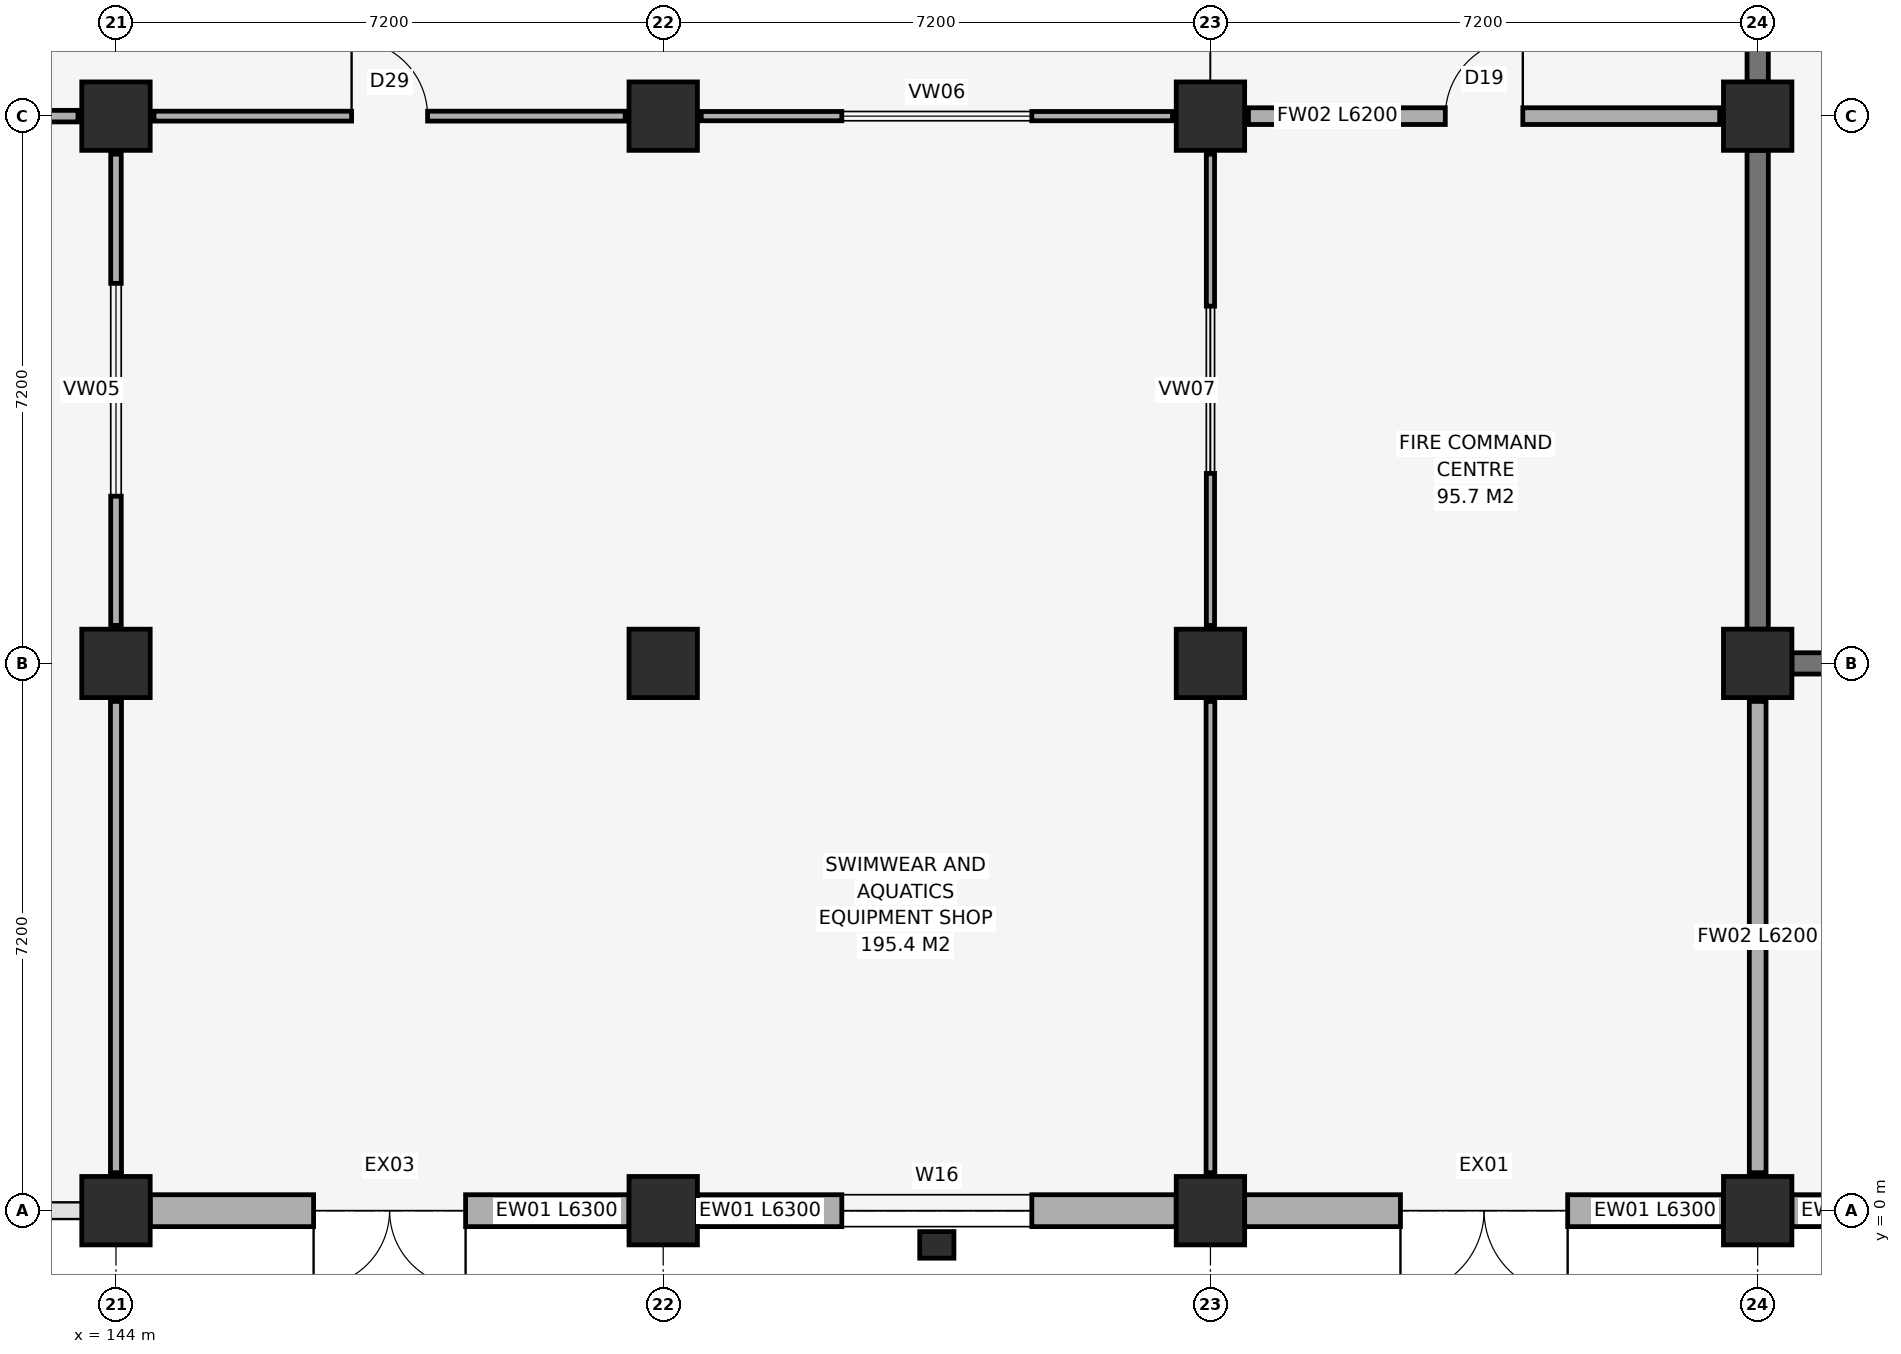
"""IFC4 building model, lengths in metres.
Left out: names, types, materials, properties, quantities, classifications, styles, units other than length and angle.
Written with IfcOpenShell. Run it as: python <this file> out.ifc"""

import sys

from ifc_helpers import new_model, si_unit, direction, frame, frame_2d, origin, origin_2d, place, context, subcontext, project, spatial, rectangle, extrude, element, fill, save


model = new_model("IFC4")
c1 = context("Model", 3, precision=1e-05, world=origin(), true_north=direction((0.0, 1.0)))
c2 = subcontext(c1, "Body", "Model", "MODEL_VIEW")
j1 = project(units=[si_unit("LENGTHUNIT", "METRE"), si_unit("PLANEANGLEUNIT", "RADIAN")], contexts=[c1])
p1 = place(None, origin())
s1 = spatial("IfcSite", under=j1, at=p1, CompositionType="ELEMENT")
p2 = place(p1, origin())
s2 = spatial("IfcBuilding", under=s1, at=p2, CompositionType="ELEMENT")
p3 = place(p2, origin())
s3 = spatial("IfcBuildingStorey", under=s2, at=p3, CompositionType="ELEMENT", Elevation=0.0)
for number, where, z_axis, x_axis in (
    (1, (144.0, 0.0, 0.0), (0.0, 0.0, 1.0), (1.0, 0.0, 0.0)),
    (2, (144.0, 7.2, 0.0), (0.0, 0.0, 1.0), (1.0, 0.0, 0.0)),
    (3, (144.0, 14.4, 0.0), (0.0, 0.0, 1.0), (1.0, 0.0, 0.0)),
    (4, (151.2, 0.0, 0.0), (0.0, 0.0, 1.0), (1.0, 0.0, 0.0)),
    (5, (151.2, 7.2, 0.0), (0.0, 0.0, 1.0), (1.0, 0.0, 0.0)),
    (6, (151.2, 14.4, 0.0), (0.0, 0.0, 1.0), (1.0, 0.0, 0.0)),
    (7, (158.4, 0.0, 0.0), (0.0, 0.0, 1.0), (1.0, 0.0, 0.0)),
    (8, (158.4, 7.2, 0.0), (0.0, 0.0, 1.0), (1.0, 0.0, 0.0)),
    (9, (158.4, 14.4, 0.0), (0.0, 0.0, 1.0), (1.0, 0.0, 0.0)),
    (10, (165.6, 0.0, 0.0), (0.0, 0.0, 1.0), (1.0, 0.0, 0.0)),
    (11, (165.6, 7.2, 0.0), (0.0, 0.0, 1.0), (1.0, 0.0, 0.0)),
    (12, (165.6, 14.4, 0.0), (0.0, 0.0, 1.0), (1.0, 0.0, 0.0)),
):
    element("IfcColumn", number, at=place(p3, frame(where, z_axis=z_axis, x_axis=x_axis)), inside=s3, PredefinedType="COLUMN", context=c2, shape_type="SweptSolid", body=[
        extrude(rectangle(XDim=0.9, YDim=0.9, at=origin_2d()), origin(), (0.0, 0.0, 1.0), 5.4),
    ])
p4 = place(p3, frame((144.45, 0.0, 0.0), z_axis=(0.0, 0.0, 1.0), x_axis=(1.0, 0.0, 0.0)))
e13 = element("IfcWall", 13, at=p4, inside=s3, PredefinedType="SOLIDWALL", context=c2, shape_type="SweptSolid", body=[
    extrude(rectangle(XDim=6.3, YDim=0.42, at=frame_2d((3.15, 0.0))), origin(), (0.0, 0.0, 1.0), 4.64),
])
p5 = place(p4, frame((2.15, 0.0, 0.0)))
e14 = element("IfcOpeningElement", 14, at=p5, cuts=e13, PredefinedType="OPENING", context=c2, shape_type="SweptSolid", body=[
    extrude(rectangle(XDim=2.0, YDim=2.3, at=frame_2d((1.0, 1.15))), frame((0.0, 0.225, 0.0), z_axis=(0.0, -1.0, 0.0), x_axis=(1.0, 0.0, 0.0)), (0.0, 0.0, 1.0), 0.45),
])
p6 = place(p3, frame((151.65, 0.0, 0.0), z_axis=(0.0, 0.0, 1.0), x_axis=(1.0, 0.0, 0.0)))
e15 = element("IfcWall", 15, at=p6, inside=s3, PredefinedType="SOLIDWALL", context=c2, shape_type="SweptSolid", body=[
    extrude(rectangle(XDim=6.3, YDim=0.42, at=frame_2d((3.15, 0.0))), origin(), (0.0, 0.0, 1.0), 4.64),
])
p7 = place(p6, frame((1.9, 0.0, 0.95)))
e16 = element("IfcOpeningElement", 16, at=p7, cuts=e15, PredefinedType="OPENING", context=c2, shape_type="SweptSolid", body=[
    extrude(rectangle(XDim=2.5, YDim=1.35, at=frame_2d((1.25, 0.675))), frame((0.0, 0.225, 0.0), z_axis=(0.0, -1.0, 0.0), x_axis=(1.0, 0.0, 0.0)), (0.0, 0.0, 1.0), 0.45),
])
p8 = place(p3, frame((158.85, 0.0, 0.0), z_axis=(0.0, 0.0, 1.0), x_axis=(1.0, 0.0, 0.0)))
e17 = element("IfcWall", 17, at=p8, inside=s3, PredefinedType="SOLIDWALL", context=c2, shape_type="SweptSolid", body=[
    extrude(rectangle(XDim=6.3, YDim=0.42, at=frame_2d((3.15, 0.0))), origin(), (0.0, 0.0, 1.0), 4.64),
])
p9 = place(p8, frame((2.05, 0.0, 0.0)))
e18 = element("IfcOpeningElement", 18, at=p9, cuts=e17, PredefinedType="OPENING", context=c2, shape_type="SweptSolid", body=[
    extrude(rectangle(XDim=2.2, YDim=2.4, at=frame_2d((1.1, 1.2))), frame((0.0, 0.225, 0.0), z_axis=(0.0, -1.0, 0.0), x_axis=(1.0, 0.0, 0.0)), (0.0, 0.0, 1.0), 0.45),
])
p10 = place(p3, frame((166.05, 0.0, 0.0), z_axis=(0.0, 0.0, 1.0), x_axis=(1.0, 0.0, 0.0)))
e19 = element("IfcWall", 19, at=p10, inside=s3, PredefinedType="SOLIDWALL", context=c2, shape_type="SweptSolid", body=[
    extrude(rectangle(XDim=6.3, YDim=0.42, at=frame_2d((3.15, 0.0))), origin(), (0.0, 0.0, 1.0), 4.64),
])
p11 = place(p10, frame((2.1, 0.0, 0.95)))
e20 = element("IfcOpeningElement", 20, at=p11, cuts=e19, PredefinedType="OPENING", context=c2, shape_type="SweptSolid", body=[
    extrude(rectangle(XDim=2.1, YDim=2.0, at=frame_2d((1.05, 1.0))), frame((0.0, 0.225, 0.0), z_axis=(0.0, -1.0, 0.0), x_axis=(1.0, 0.0, 0.0)), (0.0, 0.0, 1.0), 0.45),
])
for number, where, z_axis, x_axis in (
    (21, (166.05, 7.2, 0.0), (0.0, 0.0, 1.0), (1.0, 0.0, 0.0)),
    (22, (165.6, 7.65, 0.0), (0.0, 0.0, 1.0), (0.0, 1.0, 0.0)),
):
    element("IfcWall", number, at=place(p3, frame(where, z_axis=z_axis, x_axis=x_axis)), inside=s3, PredefinedType="SHEAR", context=c2, shape_type="SweptSolid", body=[
        extrude(rectangle(XDim=6.3, YDim=0.28, at=frame_2d((3.15, 0.0))), origin(), (0.0, 0.0, 1.0), 5.14),
    ])
p12 = place(p3, frame((165.6, 14.85, 0.0), z_axis=(0.0, 0.0, 1.0), x_axis=(0.0, 1.0, 0.0)))
e23 = element("IfcWall", 23, at=p12, inside=s3, PredefinedType="SHEAR", context=c2, shape_type="SweptSolid", body=[
    extrude(rectangle(XDim=6.3, YDim=0.28, at=frame_2d((3.15, 0.0))), origin(), (0.0, 0.0, 1.0), 5.14),
])
p13 = place(p12, frame((2.35, 0.0, 0.0)))
e24 = element("IfcOpeningElement", 24, at=p13, cuts=e23, PredefinedType="OPENING", context=c2, shape_type="SweptSolid", body=[
    extrude(rectangle(XDim=1.6, YDim=2.2, at=frame_2d((0.8, 1.1))), frame((0.0, 0.155, 0.0), z_axis=(0.0, -1.0, 0.0), x_axis=(1.0, 0.0, 0.0)), (0.0, 0.0, 1.0), 0.31),
])
p14 = place(p3, frame((137.3, 14.4, 0.0), z_axis=(0.0, 0.0, 1.0), x_axis=(1.0, 0.0, 0.0)))
e25 = element("IfcWall", 25, at=p14, inside=s3, PredefinedType="PARTITIONING", context=c2, shape_type="SweptSolid", body=[
    extrude(rectangle(XDim=6.2, YDim=0.152, at=frame_2d((3.1, 0.0))), origin(), (0.0, 0.0, 1.0), 4.29),
])
p15 = place(p14, frame((2.15, 0.0, 0.95)))
e26 = element("IfcOpeningElement", 26, at=p15, cuts=e25, PredefinedType="OPENING", context=c2, shape_type="SweptSolid", body=[
    extrude(rectangle(XDim=1.9, YDim=1.5, at=frame_2d((0.95, 0.75))), frame((0.0, 0.091, 0.0), z_axis=(0.0, -1.0, 0.0), x_axis=(1.0, 0.0, 0.0)), (0.0, 0.0, 1.0), 0.182),
])
p16 = place(p3, frame((144.0, 0.5, 0.0), z_axis=(0.0, 0.0, 1.0), x_axis=(0.0, 1.0, 0.0)))
e27 = element("IfcWall", 27, at=p16, inside=s3, PredefinedType="PARTITIONING", context=c2, shape_type="SweptSolid", body=[
    extrude(rectangle(XDim=6.2, YDim=0.145, at=frame_2d((3.1, 0.0))), origin(), (0.0, 0.0, 1.0), 4.34),
])
p17 = place(p3, frame((144.0, 7.7, 0.0), z_axis=(0.0, 0.0, 1.0), x_axis=(0.0, 1.0, 0.0)))
e28 = element("IfcWall", 28, at=p17, inside=s3, PredefinedType="PARTITIONING", context=c2, shape_type="SweptSolid", body=[
    extrude(rectangle(XDim=6.2, YDim=0.138, at=frame_2d((3.1, 0.0))), origin(), (0.0, 0.0, 1.0), 4.44),
])
p18 = place(p17, frame((1.7, 0.0, 0.95)))
e29 = element("IfcOpeningElement", 29, at=p18, cuts=e28, PredefinedType="OPENING", context=c2, shape_type="SweptSolid", body=[
    extrude(rectangle(XDim=2.8, YDim=1.35, at=frame_2d((1.4, 0.675))), frame((0.0, 0.084, 0.0), z_axis=(0.0, -1.0, 0.0), x_axis=(1.0, 0.0, 0.0)), (0.0, 0.0, 1.0), 0.168),
])
p19 = place(p3, frame((144.5, 14.4, 0.0), z_axis=(0.0, 0.0, 1.0), x_axis=(1.0, 0.0, 0.0)))
e30 = element("IfcWall", 30, at=p19, inside=s3, PredefinedType="PARTITIONING", context=c2, shape_type="SweptSolid", body=[
    extrude(rectangle(XDim=6.2, YDim=0.13, at=frame_2d((3.1, 0.0))), origin(), (0.0, 0.0, 1.0), 4.29),
])
p20 = place(p19, frame((2.6, 0.0, 0.0)))
e31 = element("IfcOpeningElement", 31, at=p20, cuts=e30, PredefinedType="OPENING", context=c2, shape_type="SweptSolid", body=[
    extrude(rectangle(XDim=1.0, YDim=2.18, at=frame_2d((0.5, 1.09))), frame((0.0, 0.08, 0.0), z_axis=(0.0, -1.0, 0.0), x_axis=(1.0, 0.0, 0.0)), (0.0, 0.0, 1.0), 0.16),
])
p21 = place(p3, frame((151.7, 14.4, 0.0), z_axis=(0.0, 0.0, 1.0), x_axis=(1.0, 0.0, 0.0)))
e32 = element("IfcWall", 32, at=p21, inside=s3, PredefinedType="PARTITIONING", context=c2, shape_type="SweptSolid", body=[
    extrude(rectangle(XDim=6.2, YDim=0.122, at=frame_2d((3.1, 0.0))), origin(), (0.0, 0.0, 1.0), 4.29),
])
p22 = place(p21, frame((1.85, 0.0, 0.95)))
e33 = element("IfcOpeningElement", 33, at=p22, cuts=e32, PredefinedType="OPENING", context=c2, shape_type="SweptSolid", body=[
    extrude(rectangle(XDim=2.5, YDim=1.35, at=frame_2d((1.25, 0.675))), frame((0.0, 0.076, 0.0), z_axis=(0.0, -1.0, 0.0), x_axis=(1.0, 0.0, 0.0)), (0.0, 0.0, 1.0), 0.152),
])
p23 = place(p3, frame((158.4, 0.5, 0.0), z_axis=(0.0, 0.0, 1.0), x_axis=(0.0, 1.0, 0.0)))
e34 = element("IfcWall", 34, at=p23, inside=s3, PredefinedType="PARTITIONING", context=c2, shape_type="SweptSolid", body=[
    extrude(rectangle(XDim=6.2, YDim=0.115, at=frame_2d((3.1, 0.0))), origin(), (0.0, 0.0, 1.0), 4.49),
])
p24 = place(p3, frame((158.4, 7.7, 0.0), z_axis=(0.0, 0.0, 1.0), x_axis=(0.0, 1.0, 0.0)))
e35 = element("IfcWall", 35, at=p24, inside=s3, PredefinedType="PARTITIONING", context=c2, shape_type="SweptSolid", body=[
    extrude(rectangle(XDim=6.2, YDim=0.108, at=frame_2d((3.1, 0.0))), origin(), (0.0, 0.0, 1.0), 4.49),
])
p25 = place(p24, frame((2.0, 0.0, 0.95)))
e36 = element("IfcOpeningElement", 36, at=p25, cuts=e35, PredefinedType="OPENING", context=c2, shape_type="SweptSolid", body=[
    extrude(rectangle(XDim=2.2, YDim=1.35, at=frame_2d((1.1, 0.675))), frame((0.0, 0.069, 0.0), z_axis=(0.0, -1.0, 0.0), x_axis=(1.0, 0.0, 0.0)), (0.0, 0.0, 1.0), 0.138),
])
p26 = place(p3, frame((158.9, 14.4, 0.0), z_axis=(0.0, 0.0, 1.0), x_axis=(1.0, 0.0, 0.0)))
e37 = element("IfcWall", 37, at=p26, inside=s3, PredefinedType="SOLIDWALL", context=c2, shape_type="SweptSolid", body=[
    extrude(rectangle(XDim=6.2, YDim=0.22, at=frame_2d((3.1, 0.0))), origin(), (0.0, 0.0, 1.0), 4.29),
])
p27 = place(p26, frame((2.59, 0.0, 0.0)))
e38 = element("IfcOpeningElement", 38, at=p27, cuts=e37, PredefinedType="OPENING", context=c2, shape_type="SweptSolid", body=[
    extrude(rectangle(XDim=1.02, YDim=2.15, at=frame_2d((0.51, 1.075))), frame((0.0, 0.125, 0.0), z_axis=(0.0, -1.0, 0.0), x_axis=(1.0, 0.0, 0.0)), (0.0, 0.0, 1.0), 0.25),
])
p28 = place(p3, frame((165.6, 0.5, 0.0), z_axis=(0.0, 0.0, 1.0), x_axis=(0.0, 1.0, 0.0)))
e39 = element("IfcWall", 39, at=p28, inside=s3, PredefinedType="SOLIDWALL", context=c2, shape_type="SweptSolid", body=[
    extrude(rectangle(XDim=6.2, YDim=0.22, at=frame_2d((3.1, 0.0))), origin(), (0.0, 0.0, 1.0), 4.49),
])
p29 = place(p3, frame((154.8, -0.45, 0.0), z_axis=(0.0, 0.0, 1.0), x_axis=(1.0, 0.0, 0.0)))
e40 = element("IfcColumn", 40, at=p29, inside=s3, PredefinedType="PILASTER", context=c2, shape_type="SweptSolid", body=[
    extrude(rectangle(XDim=0.45, YDim=0.35, at=origin_2d()), origin(), (0.0, 0.0, 1.0), 5.1),
])
p30 = place(p5, frame((2.0, 0.0, 0.0), z_axis=(0.0, 0.0, 1.0), x_axis=(-1.0, 0.0, 0.0)))
e41 = element("IfcDoor", 41, at=p30, inside=s3, OperationType="DOUBLE_SWING_LEFT", PredefinedType="DOOR", context=c2, shape_type="SweptSolid", body=[
    extrude(rectangle(XDim=2.0, YDim=2.3, at=frame_2d((1.0, 1.15))), frame((0.0, 0.025, 0.0), z_axis=(0.0, -1.0, 0.0), x_axis=(1.0, 0.0, 0.0)), (0.0, 0.0, 1.0), 0.05),
])
fill(e14, e41)
p31 = place(p7, origin())
e42 = element("IfcWindow", 42, at=p31, inside=s3, PartitioningType="SINGLE_PANEL", PredefinedType="WINDOW", context=c2, shape_type="SweptSolid", body=[
    extrude(rectangle(XDim=2.5, YDim=1.35, at=frame_2d((1.25, 0.675))), frame((0.0, 0.03, 0.0), z_axis=(0.0, -1.0, 0.0), x_axis=(1.0, 0.0, 0.0)), (0.0, 0.0, 1.0), 0.06),
])
fill(e16, e42)
p32 = place(p9, frame((2.2, 0.0, 0.0), z_axis=(0.0, 0.0, 1.0), x_axis=(-1.0, 0.0, 0.0)))
e43 = element("IfcDoor", 43, at=p32, inside=s3, OperationType="DOUBLE_SWING_LEFT", PredefinedType="DOOR", context=c2, shape_type="SweptSolid", body=[
    extrude(rectangle(XDim=2.2, YDim=2.4, at=frame_2d((1.1, 1.2))), frame((0.0, 0.025, 0.0), z_axis=(0.0, -1.0, 0.0), x_axis=(1.0, 0.0, 0.0)), (0.0, 0.0, 1.0), 0.05),
])
fill(e18, e43)
p33 = place(p18, origin())
e44 = element("IfcWindow", 44, at=p33, inside=s3, PartitioningType="SINGLE_PANEL", PredefinedType="WINDOW", context=c2, shape_type="SweptSolid", body=[
    extrude(rectangle(XDim=2.8, YDim=1.35, at=frame_2d((1.4, 0.675))), frame((0.0, 0.03, 0.0), z_axis=(0.0, -1.0, 0.0), x_axis=(1.0, 0.0, 0.0)), (0.0, 0.0, 1.0), 0.06),
])
fill(e29, e44)
p34 = place(p20, frame((1.0, 0.0, 0.0), z_axis=(0.0, 0.0, 1.0), x_axis=(-1.0, 0.0, 0.0)))
e45 = element("IfcDoor", 45, at=p34, inside=s3, OperationType="SINGLE_SWING_RIGHT", PredefinedType="DOOR", context=c2, shape_type="SweptSolid", body=[
    extrude(rectangle(XDim=1.0, YDim=2.18, at=frame_2d((0.5, 1.09))), frame((0.0, 0.025, 0.0), z_axis=(0.0, -1.0, 0.0), x_axis=(1.0, 0.0, 0.0)), (0.0, 0.0, 1.0), 0.05),
])
fill(e31, e45)
p35 = place(p22, origin())
e46 = element("IfcWindow", 46, at=p35, inside=s3, PartitioningType="SINGLE_PANEL", PredefinedType="WINDOW", context=c2, shape_type="SweptSolid", body=[
    extrude(rectangle(XDim=2.5, YDim=1.35, at=frame_2d((1.25, 0.675))), frame((0.0, 0.03, 0.0), z_axis=(0.0, -1.0, 0.0), x_axis=(1.0, 0.0, 0.0)), (0.0, 0.0, 1.0), 0.06),
])
fill(e33, e46)
p36 = place(p25, origin())
e47 = element("IfcWindow", 47, at=p36, inside=s3, PartitioningType="SINGLE_PANEL", PredefinedType="WINDOW", context=c2, shape_type="SweptSolid", body=[
    extrude(rectangle(XDim=2.2, YDim=1.35, at=frame_2d((1.1, 0.675))), frame((0.0, 0.03, 0.0), z_axis=(0.0, -1.0, 0.0), x_axis=(1.0, 0.0, 0.0)), (0.0, 0.0, 1.0), 0.06),
])
fill(e36, e47)
p37 = place(p27, frame((1.02, 0.0, 0.0), z_axis=(0.0, 0.0, 1.0), x_axis=(-1.0, 0.0, 0.0)))
e48 = element("IfcDoor", 48, at=p37, inside=s3, OperationType="SINGLE_SWING_LEFT", PredefinedType="DOOR", context=c2, shape_type="SweptSolid", body=[
    extrude(rectangle(XDim=1.02, YDim=2.15, at=frame_2d((0.51, 1.075))), frame((0.0, 0.025, 0.0), z_axis=(0.0, -1.0, 0.0), x_axis=(1.0, 0.0, 0.0)), (0.0, 0.0, 1.0), 0.05),
])
fill(e38, e48)
save(model, sys.argv[1])
